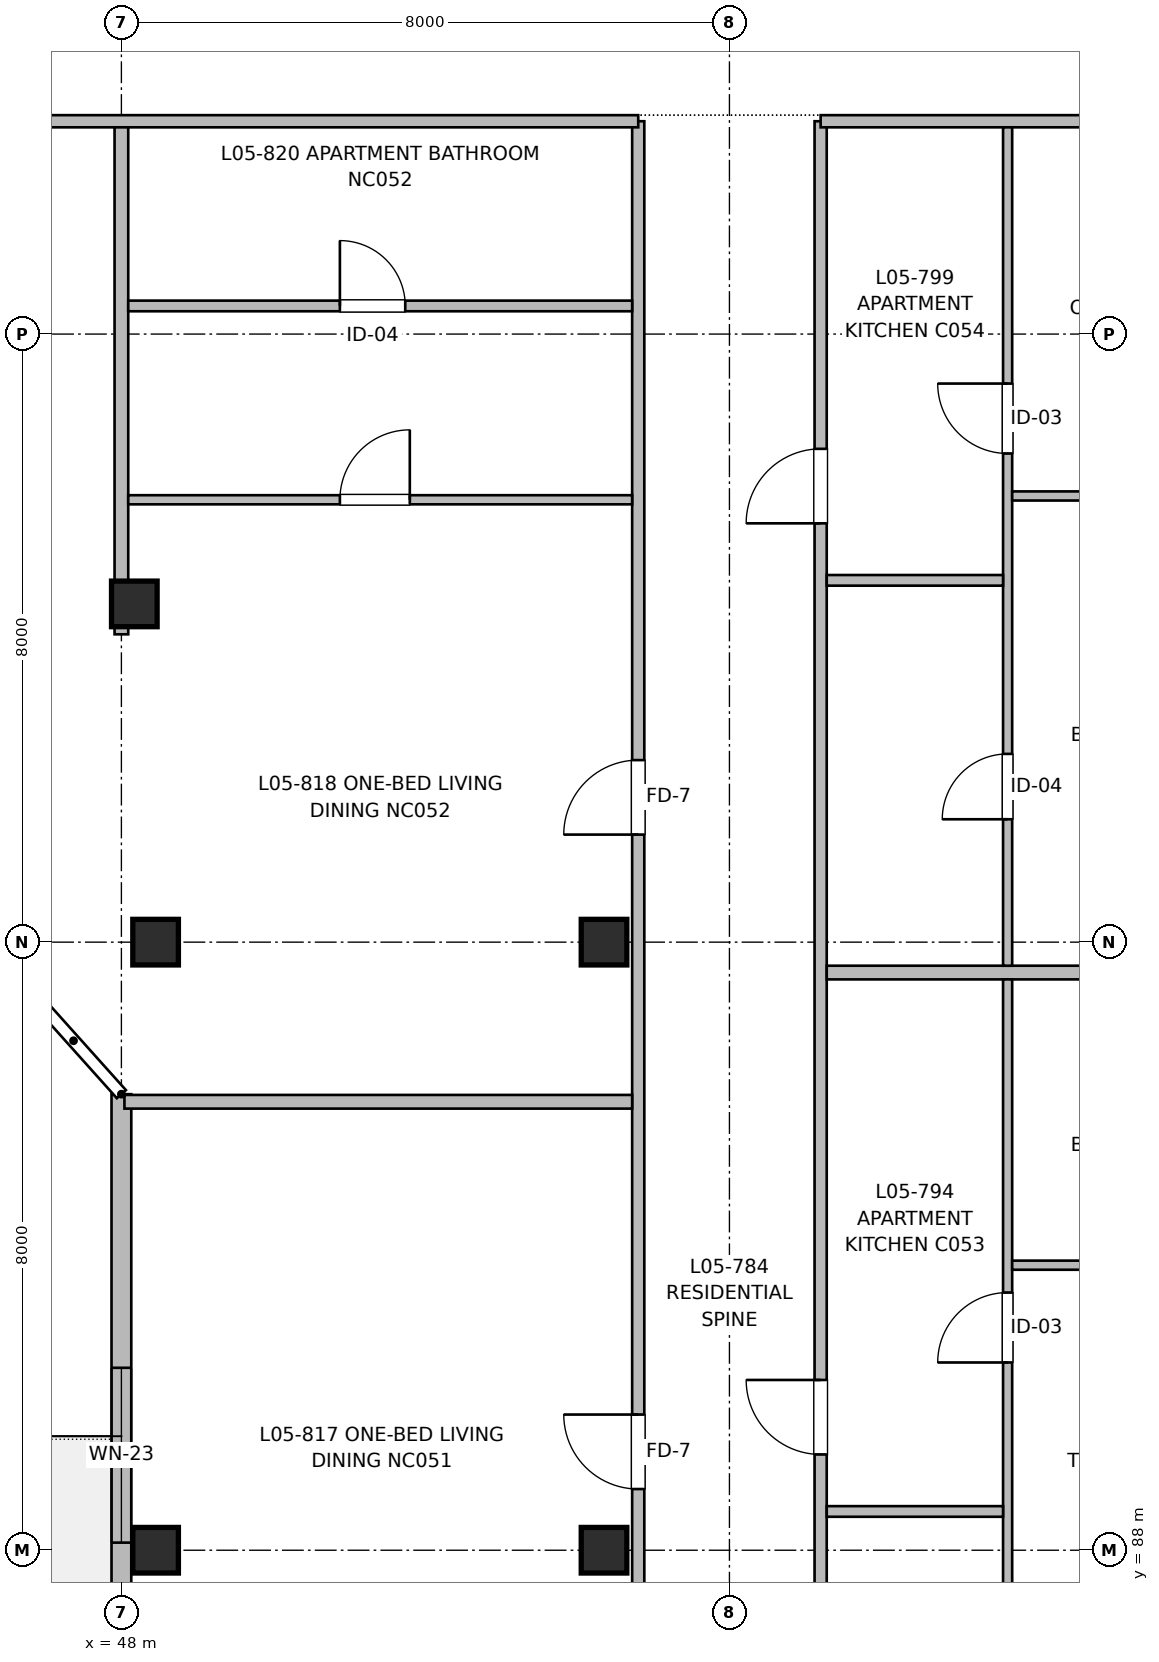
"""IFC4 building model, lengths in metres.
Left out: names, types, materials, properties, quantities, classifications, styles, units other than length and angle.
Written with IfcOpenShell. Run it as: python <this file> out.ifc"""

import sys

from ifc_helpers import new_model, si_unit, direction, frame, frame_2d, origin, origin_2d, place, context, subcontext, project, spatial, rectangle, extrude, element, fill, save


model = new_model("IFC4")
c1 = context("Model", 3, precision=1e-05, world=origin(), true_north=direction((0.0, 1.0)))
c2 = subcontext(c1, "Body", "Model", "MODEL_VIEW")
j1 = project(units=[si_unit("LENGTHUNIT", "METRE"), si_unit("PLANEANGLEUNIT", "RADIAN")], contexts=[c1])
p1 = place(None, origin())
s1 = spatial("IfcSite", under=j1, at=p1, CompositionType="ELEMENT")
p2 = place(p1, origin())
s2 = spatial("IfcBuilding", under=s1, at=p2, CompositionType="ELEMENT")
p3 = place(p2, frame((0.0, 0.0, 16.96)))
s3 = spatial("IfcBuildingStorey", under=s2, at=p3, CompositionType="ELEMENT", Elevation=16.96)
for number, where, z_axis, x_axis in (
    (1, (48.17, 100.45, 0.0), (0.0, 0.0, 1.0), (1.0, 0.0, 0.0)),
    (2, (48.45, 88.0, 0.0), (0.0, 0.0, 1.0), (1.0, 0.0, 0.0)),
    (3, (48.45, 96.0, 0.0), (0.0, 0.0, 1.0), (1.0, 0.0, 0.0)),
    (4, (54.35, 88.0, 0.0), (0.0, 0.0, 1.0), (1.0, 0.0, 0.0)),
    (5, (54.35, 96.0, 0.0), (0.0, 0.0, 1.0), (1.0, 0.0, 0.0)),
):
    element("IfcColumn", number, at=place(p3, frame(where, z_axis=z_axis, x_axis=x_axis)), inside=s3, PredefinedType="COLUMN", context=c2, shape_type="SweptSolid", body=[
        extrude(rectangle(XDim=0.6, YDim=0.6, at=origin_2d()), origin(), (0.0, 0.0, 1.0), 3.2),
    ])
p4 = place(p3, frame((48.0, 56.0, 0.0), z_axis=(0.0, 0.0, 1.0), x_axis=(0.0, 1.0, 0.0)))
e6 = element("IfcWall", 6, at=p4, inside=s3, PredefinedType="SOLIDWALL", context=c2, shape_type="SweptSolid", body=[
    extrude(rectangle(XDim=38.0, YDim=0.26, at=frame_2d((19.0, 0.0))), origin(), (0.0, 0.0, 1.0), 2.98),
])
p5 = place(p4, frame((4.15, 0.0, 0.0)))
e7 = element("IfcOpeningElement", 7, at=p5, cuts=e6, PredefinedType="OPENING", context=c2, shape_type="SweptSolid", body=[
    extrude(rectangle(XDim=1.2, YDim=2.2, at=frame_2d((0.6, 1.1))), frame((0.0, 0.14, 0.0), z_axis=(0.0, -1.0, 0.0), x_axis=(1.0, 0.0, 0.0)), (0.0, 0.0, 1.0), 0.28),
])
p6 = place(p4, frame((6.05, 0.0, 0.72)))
e8 = element("IfcOpeningElement", 8, at=p6, cuts=e6, PredefinedType="OPENING", context=c2, shape_type="SweptSolid", body=[
    extrude(rectangle(XDim=1.68, YDim=1.5, at=frame_2d((0.84, 0.75))), frame((0.0, 0.14, 0.0), z_axis=(0.0, -1.0, 0.0), x_axis=(1.0, 0.0, 0.0)), (0.0, 0.0, 1.0), 0.28),
])
p7 = place(p4, frame((12.9, 0.0, 0.47)))
e9 = element("IfcOpeningElement", 9, at=p7, cuts=e6, PredefinedType="OPENING", context=c2, shape_type="SweptSolid", body=[
    extrude(rectangle(XDim=2.7, YDim=1.75, at=frame_2d((1.35, 0.875))), frame((0.0, 0.14, 0.0), z_axis=(0.0, -1.0, 0.0), x_axis=(1.0, 0.0, 0.0)), (0.0, 0.0, 1.0), 0.28),
])
p8 = place(p4, frame((24.2, 0.0, 0.72)))
e10 = element("IfcOpeningElement", 10, at=p8, cuts=e6, PredefinedType="OPENING", context=c2, shape_type="SweptSolid", body=[
    extrude(rectangle(XDim=1.7, YDim=1.5, at=frame_2d((0.85, 0.75))), frame((0.0, 0.14, 0.0), z_axis=(0.0, -1.0, 0.0), x_axis=(1.0, 0.0, 0.0)), (0.0, 0.0, 1.0), 0.28),
])
p9 = place(p4, frame((32.1, 0.0, 0.57)))
e11 = element("IfcOpeningElement", 11, at=p9, cuts=e6, PredefinedType="OPENING", context=c2, shape_type="SweptSolid", body=[
    extrude(rectangle(XDim=2.3, YDim=1.65, at=frame_2d((1.15, 0.825))), frame((0.0, 0.14, 0.0), z_axis=(0.0, -1.0, 0.0), x_axis=(1.0, 0.0, 0.0)), (0.0, 0.0, 1.0), 0.28),
])
p10 = place(p3, frame((54.8, 56.16, 0.0), z_axis=(0.0, 0.0, 1.0), x_axis=(0.0, 1.0, 0.0)))
e12 = element("IfcWall", 12, at=p10, inside=s3, PredefinedType="PARTITIONING", context=c2, shape_type="SweptSolid", body=[
    extrude(rectangle(XDim=50.64, YDim=0.16, at=frame_2d((25.32, 0.0))), origin(), (0.0, 0.0, 1.0), 2.935),
])
p11 = place(p10, frame((12.84, 0.0, 0.0)))
e13 = element("IfcOpeningElement", 13, at=p11, cuts=e12, PredefinedType="OPENING", context=c2, shape_type="SweptSolid", body=[
    extrude(rectangle(XDim=1.1, YDim=2.15, at=frame_2d((0.55, 1.075))), frame((0.0, 0.09, 0.0), z_axis=(0.0, -1.0, 0.0), x_axis=(1.0, 0.0, 0.0)), (0.0, 0.0, 1.0), 0.18),
])
p12 = place(p10, frame((19.24, 0.0, 0.0)))
e14 = element("IfcOpeningElement", 14, at=p12, cuts=e12, PredefinedType="OPENING", context=c2, shape_type="SweptSolid", body=[
    extrude(rectangle(XDim=1.6, YDim=2.15, at=frame_2d((0.8, 1.075))), frame((0.0, 0.09, 0.0), z_axis=(0.0, -1.0, 0.0), x_axis=(1.0, 0.0, 0.0)), (0.0, 0.0, 1.0), 0.18),
])
p13 = place(p10, frame((1.8, 0.0, 0.0)))
e15 = element("IfcOpeningElement", 15, at=p13, cuts=e12, PredefinedType="OPENING", context=c2, shape_type="SweptSolid", body=[
    extrude(rectangle(XDim=0.96, YDim=2.15, at=frame_2d((0.48, 1.075))), frame((0.0, 0.09, 0.0), z_axis=(0.0, -1.0, 0.0), x_axis=(1.0, 0.0, 0.0)), (0.0, 0.0, 1.0), 0.18),
])
p14 = place(p10, frame((32.645, 0.0, 0.0)))
e16 = element("IfcOpeningElement", 16, at=p14, cuts=e12, PredefinedType="OPENING", context=c2, shape_type="SweptSolid", body=[
    extrude(rectangle(XDim=0.98, YDim=2.15, at=frame_2d((0.49, 1.075))), frame((0.0, 0.09, 0.0), z_axis=(0.0, -1.0, 0.0), x_axis=(1.0, 0.0, 0.0)), (0.0, 0.0, 1.0), 0.18),
])
p15 = place(p10, frame((41.255, 0.0, 0.0)))
e17 = element("IfcOpeningElement", 17, at=p15, cuts=e12, PredefinedType="OPENING", context=c2, shape_type="SweptSolid", body=[
    extrude(rectangle(XDim=0.98, YDim=2.15, at=frame_2d((0.49, 1.075))), frame((0.0, 0.09, 0.0), z_axis=(0.0, -1.0, 0.0), x_axis=(1.0, 0.0, 0.0)), (0.0, 0.0, 1.0), 0.18),
])
p16 = place(p3, frame((57.2, 56.16, 0.0), z_axis=(0.0, 0.0, 1.0), x_axis=(0.0, 1.0, 0.0)))
e18 = element("IfcWall", 18, at=p16, inside=s3, PredefinedType="PARTITIONING", context=c2, shape_type="SweptSolid", body=[
    extrude(rectangle(XDim=50.64, YDim=0.16, at=frame_2d((25.32, 0.0))), origin(), (0.0, 0.0, 1.0), 2.935),
])
p17 = place(p16, frame((5.27, 0.0, 0.0)))
e19 = element("IfcOpeningElement", 19, at=p17, cuts=e18, PredefinedType="OPENING", context=c2, shape_type="SweptSolid", body=[
    extrude(rectangle(XDim=1.5, YDim=2.2, at=frame_2d((0.75, 1.1))), frame((0.0, 0.09, 0.0), z_axis=(0.0, -1.0, 0.0), x_axis=(1.0, 0.0, 0.0)), (0.0, 0.0, 1.0), 0.18),
])
p18 = place(p16, frame((19.4, 0.0, 0.0)))
e20 = element("IfcOpeningElement", 20, at=p18, cuts=e18, PredefinedType="OPENING", context=c2, shape_type="SweptSolid", body=[
    extrude(rectangle(XDim=1.02, YDim=2.15, at=frame_2d((0.51, 1.075))), frame((0.0, 0.09, 0.0), z_axis=(0.0, -1.0, 0.0), x_axis=(1.0, 0.0, 0.0)), (0.0, 0.0, 1.0), 0.18),
])
p19 = place(p16, frame((33.1, 0.0, 0.0)))
e21 = element("IfcOpeningElement", 21, at=p19, cuts=e18, PredefinedType="OPENING", context=c2, shape_type="SweptSolid", body=[
    extrude(rectangle(XDim=0.98, YDim=2.15, at=frame_2d((0.49, 1.075))), frame((0.0, 0.09, 0.0), z_axis=(0.0, -1.0, 0.0), x_axis=(1.0, 0.0, 0.0)), (0.0, 0.0, 1.0), 0.18),
])
p20 = place(p16, frame((45.35, 0.0, 0.0)))
e22 = element("IfcOpeningElement", 22, at=p20, cuts=e18, PredefinedType="OPENING", context=c2, shape_type="SweptSolid", body=[
    extrude(rectangle(XDim=0.98, YDim=2.15, at=frame_2d((0.49, 1.075))), frame((0.0, 0.09, 0.0), z_axis=(0.0, -1.0, 0.0), x_axis=(1.0, 0.0, 0.0)), (0.0, 0.0, 1.0), 0.18),
])
p21 = place(p3, frame((39.66, 106.8, 0.0), z_axis=(0.0, 0.0, 1.0), x_axis=(1.0, 0.0, 0.0)))
e23 = element("IfcWall", 23, at=p21, inside=s3, PredefinedType="PARTITIONING", context=c2, shape_type="SweptSolid", body=[
    extrude(rectangle(XDim=15.14, YDim=0.16, at=frame_2d((7.57, 0.0))), origin(), (0.0, 0.0, 1.0), 2.935),
])
p22 = place(p3, frame((57.2, 106.8, 0.0), z_axis=(0.0, 0.0, 1.0), x_axis=(1.0, 0.0, 0.0)))
e24 = element("IfcWall", 24, at=p22, inside=s3, PredefinedType="PARTITIONING", context=c2, shape_type="SweptSolid", body=[
    extrude(rectangle(XDim=24.14, YDim=0.16, at=frame_2d((12.07, 0.0))), origin(), (0.0, 0.0, 1.0), 2.935),
])
p23 = place(p22, frame((19.575, 0.0, 0.0)))
e25 = element("IfcOpeningElement", 25, at=p23, cuts=e24, PredefinedType="OPENING", context=c2, shape_type="SweptSolid", body=[
    extrude(rectangle(XDim=1.05, YDim=2.15, at=frame_2d((0.525, 1.075))), frame((0.0, 0.09, 0.0), z_axis=(0.0, -1.0, 0.0), x_axis=(1.0, 0.0, 0.0)), (0.0, 0.0, 1.0), 0.18),
])
p24 = place(p22, frame((8.995, 0.0, 0.0)))
e26 = element("IfcOpeningElement", 26, at=p24, cuts=e24, PredefinedType="OPENING", context=c2, shape_type="SweptSolid", body=[
    extrude(rectangle(XDim=0.98, YDim=2.15, at=frame_2d((0.49, 1.075))), frame((0.0, 0.09, 0.0), z_axis=(0.0, -1.0, 0.0), x_axis=(1.0, 0.0, 0.0)), (0.0, 0.0, 1.0), 0.18),
])
p25 = place(p3, frame((48.0, 100.05, 0.0), z_axis=(0.0, 0.0, 1.0), x_axis=(0.0, 1.0, 0.0)))
e27 = element("IfcWall", 27, at=p25, inside=s3, PredefinedType="PARTITIONING", context=c2, shape_type="SweptSolid", body=[
    extrude(rectangle(XDim=6.67, YDim=0.18, at=frame_2d((3.335, 0.0))), origin(), (0.0, 0.0, 1.0), 2.68),
])
p26 = place(p3, frame((57.28, 95.6, 0.0), z_axis=(0.0, 0.0, 1.0), x_axis=(1.0, 0.0, 0.0)))
e28 = element("IfcWall", 28, at=p26, inside=s3, PredefinedType="PARTITIONING", context=c2, shape_type="SweptSolid", body=[
    extrude(rectangle(XDim=13.387, YDim=0.18, at=frame_2d((6.694, 0.0))), origin(), (0.0, 0.0, 1.0), 2.935),
])
p27 = place(p3, frame((59.66, 82.54, 0.0), z_axis=(0.0, 0.0, 1.0), x_axis=(0.0, 1.0, 0.0)))
e29 = element("IfcWall", 29, at=p27, inside=s3, PredefinedType="PARTITIONING", context=c2, shape_type="SweptSolid", body=[
    extrude(rectangle(XDim=12.97, YDim=0.12, at=frame_2d((6.485, 0.0))), origin(), (0.0, 0.0, 1.0), 2.935),
])
p28 = place(p27, frame((2.269, 0.0, 0.0)))
e30 = element("IfcOpeningElement", 30, at=p28, cuts=e29, PredefinedType="OPENING", context=c2, shape_type="SweptSolid", body=[
    extrude(rectangle(XDim=0.86, YDim=2.1, at=frame_2d((0.43, 1.05))), frame((0.0, 0.07, 0.0), z_axis=(0.0, -1.0, 0.0), x_axis=(1.0, 0.0, 0.0)), (0.0, 0.0, 1.0), 0.14),
])
p29 = place(p27, frame((7.93, 0.0, 0.0)))
e31 = element("IfcOpeningElement", 31, at=p29, cuts=e29, PredefinedType="OPENING", context=c2, shape_type="SweptSolid", body=[
    extrude(rectangle(XDim=0.92, YDim=2.1, at=frame_2d((0.46, 1.05))), frame((0.0, 0.07, 0.0), z_axis=(0.0, -1.0, 0.0), x_axis=(1.0, 0.0, 0.0)), (0.0, 0.0, 1.0), 0.14),
])
p30 = place(p3, frame((57.28, 88.51, 0.0), z_axis=(0.0, 0.0, 1.0), x_axis=(1.0, 0.0, 0.0)))
e32 = element("IfcWall", 32, at=p30, inside=s3, PredefinedType="PARTITIONING", context=c2, shape_type="SweptSolid", body=[
    extrude(rectangle(XDim=2.32, YDim=0.14, at=frame_2d((1.16, 0.0))), origin(), (0.0, 0.0, 1.0), 2.935),
])
p31 = place(p3, frame((59.72, 91.75, 0.0), z_axis=(0.0, 0.0, 1.0), x_axis=(1.0, 0.0, 0.0)))
e33 = element("IfcWall", 33, at=p31, inside=s3, PredefinedType="PARTITIONING", context=c2, shape_type="SweptSolid", body=[
    extrude(rectangle(XDim=7.237, YDim=0.12, at=frame_2d((3.619, 0.0))), origin(), (0.0, 0.0, 1.0), 2.935),
])
p32 = place(p31, frame((1.635, 0.0, 0.0)))
e34 = element("IfcOpeningElement", 34, at=p32, cuts=e33, PredefinedType="OPENING", context=c2, shape_type="SweptSolid", body=[
    extrude(rectangle(XDim=0.88, YDim=2.1, at=frame_2d((0.44, 1.05))), frame((0.0, 0.07, 0.0), z_axis=(0.0, -1.0, 0.0), x_axis=(1.0, 0.0, 0.0)), (0.0, 0.0, 1.0), 0.14),
])
p33 = place(p3, frame((59.66, 95.69, 0.0), z_axis=(0.0, 0.0, 1.0), x_axis=(0.0, 1.0, 0.0)))
e35 = element("IfcWall", 35, at=p33, inside=s3, PredefinedType="PARTITIONING", context=c2, shape_type="SweptSolid", body=[
    extrude(rectangle(XDim=11.03, YDim=0.12, at=frame_2d((5.515, 0.0))), origin(), (0.0, 0.0, 1.0), 2.935),
])
p34 = place(p33, frame((1.927, 0.0, 0.0)))
e36 = element("IfcOpeningElement", 36, at=p34, cuts=e35, PredefinedType="OPENING", context=c2, shape_type="SweptSolid", body=[
    extrude(rectangle(XDim=0.86, YDim=2.1, at=frame_2d((0.43, 1.05))), frame((0.0, 0.07, 0.0), z_axis=(0.0, -1.0, 0.0), x_axis=(1.0, 0.0, 0.0)), (0.0, 0.0, 1.0), 0.14),
])
p35 = place(p33, frame((6.739, 0.0, 0.0)))
e37 = element("IfcOpeningElement", 37, at=p35, cuts=e35, PredefinedType="OPENING", context=c2, shape_type="SweptSolid", body=[
    extrude(rectangle(XDim=0.92, YDim=2.1, at=frame_2d((0.46, 1.05))), frame((0.0, 0.07, 0.0), z_axis=(0.0, -1.0, 0.0), x_axis=(1.0, 0.0, 0.0)), (0.0, 0.0, 1.0), 0.14),
])
p36 = place(p3, frame((57.28, 100.76, 0.0), z_axis=(0.0, 0.0, 1.0), x_axis=(1.0, 0.0, 0.0)))
e38 = element("IfcWall", 38, at=p36, inside=s3, PredefinedType="PARTITIONING", context=c2, shape_type="SweptSolid", body=[
    extrude(rectangle(XDim=2.32, YDim=0.14, at=frame_2d((1.16, 0.0))), origin(), (0.0, 0.0, 1.0), 2.935),
])
p37 = place(p3, frame((59.72, 101.87, 0.0), z_axis=(0.0, 0.0, 1.0), x_axis=(1.0, 0.0, 0.0)))
e39 = element("IfcWall", 39, at=p37, inside=s3, PredefinedType="PARTITIONING", context=c2, shape_type="SweptSolid", body=[
    extrude(rectangle(XDim=4.19, YDim=0.12, at=frame_2d((2.095, 0.0))), origin(), (0.0, 0.0, 1.0), 2.935),
])
p38 = place(p37, frame((1.645, 0.0, 0.0)))
e40 = element("IfcOpeningElement", 40, at=p38, cuts=e39, PredefinedType="OPENING", context=c2, shape_type="SweptSolid", body=[
    extrude(rectangle(XDim=0.9, YDim=2.1, at=frame_2d((0.45, 1.05))), frame((0.0, 0.07, 0.0), z_axis=(0.0, -1.0, 0.0), x_axis=(1.0, 0.0, 0.0)), (0.0, 0.0, 1.0), 0.14),
])
p39 = place(p3, frame((48.04, 93.9, 0.0), z_axis=(0.0, 0.0, 1.0), x_axis=(1.0, 0.0, 0.0)))
e41 = element("IfcWall", 41, at=p39, inside=s3, PredefinedType="PARTITIONING", context=c2, shape_type="SweptSolid", body=[
    extrude(rectangle(XDim=6.68, YDim=0.18, at=frame_2d((3.34, 0.0))), origin(), (0.0, 0.0, 1.0), 2.935),
])
p40 = place(p3, frame((48.09, 101.82, 0.0), z_axis=(0.0, 0.0, 1.0), x_axis=(1.0, 0.0, 0.0)))
e42 = element("IfcWall", 42, at=p40, inside=s3, PredefinedType="PARTITIONING", context=c2, shape_type="SweptSolid", body=[
    extrude(rectangle(XDim=6.63, YDim=0.12, at=frame_2d((3.315, 0.0))), origin(), (0.0, 0.0, 1.0), 2.935),
])
p41 = place(p40, frame((2.785, 0.0, 0.0)))
e43 = element("IfcOpeningElement", 43, at=p41, cuts=e42, PredefinedType="OPENING", context=c2, shape_type="SweptSolid", body=[
    extrude(rectangle(XDim=0.92, YDim=2.1, at=frame_2d((0.46, 1.05))), frame((0.0, 0.07, 0.0), z_axis=(0.0, -1.0, 0.0), x_axis=(1.0, 0.0, 0.0)), (0.0, 0.0, 1.0), 0.14),
])
p42 = place(p3, frame((48.09, 104.37, 0.0), z_axis=(0.0, 0.0, 1.0), x_axis=(1.0, 0.0, 0.0)))
e44 = element("IfcWall", 44, at=p42, inside=s3, PredefinedType="PARTITIONING", context=c2, shape_type="SweptSolid", body=[
    extrude(rectangle(XDim=6.63, YDim=0.14, at=frame_2d((3.315, 0.0))), origin(), (0.0, 0.0, 1.0), 2.935),
])
p43 = place(p42, frame((2.785, 0.0, 0.0)))
e45 = element("IfcOpeningElement", 45, at=p43, cuts=e44, PredefinedType="OPENING", context=c2, shape_type="SweptSolid", body=[
    extrude(rectangle(XDim=0.86, YDim=2.1, at=frame_2d((0.43, 1.05))), frame((0.0, 0.08, 0.0), z_axis=(0.0, -1.0, 0.0), x_axis=(1.0, 0.0, 0.0)), (0.0, 0.0, 1.0), 0.16),
])
p44 = place(p9, origin())
e46 = element("IfcWindow", 46, at=p44, inside=s3, PartitioningType="SINGLE_PANEL", PredefinedType="WINDOW", context=c2, shape_type="SweptSolid", body=[
    extrude(rectangle(XDim=2.3, YDim=1.65, at=frame_2d((1.15, 0.825))), frame((0.0, 0.03, 0.0), z_axis=(0.0, -1.0, 0.0), x_axis=(1.0, 0.0, 0.0)), (0.0, 0.0, 1.0), 0.06),
])
fill(e11, e46)
p45 = place(p29, origin())
e47 = element("IfcDoor", 47, at=p45, inside=s3, OperationType="SINGLE_SWING_LEFT", PredefinedType="DOOR", context=c2, shape_type="SweptSolid", body=[
    extrude(rectangle(XDim=0.92, YDim=2.1, at=frame_2d((0.46, 1.05))), frame((0.0, 0.025, 0.0), z_axis=(0.0, -1.0, 0.0), x_axis=(1.0, 0.0, 0.0)), (0.0, 0.0, 1.0), 0.05),
])
fill(e31, e47)
p46 = place(p19, origin())
e48 = element("IfcDoor", 48, at=p46, inside=s3, OperationType="SINGLE_SWING_RIGHT", PredefinedType="DOOR", context=c2, shape_type="SweptSolid", body=[
    extrude(rectangle(XDim=0.98, YDim=2.15, at=frame_2d((0.49, 1.075))), frame((0.0, 0.025, 0.0), z_axis=(0.0, -1.0, 0.0), x_axis=(1.0, 0.0, 0.0)), (0.0, 0.0, 1.0), 0.05),
])
fill(e21, e48)
p47 = place(p34, origin())
e49 = element("IfcDoor", 49, at=p47, inside=s3, OperationType="SINGLE_SWING_LEFT", PredefinedType="DOOR", context=c2, shape_type="SweptSolid", body=[
    extrude(rectangle(XDim=0.86, YDim=2.1, at=frame_2d((0.43, 1.05))), frame((0.0, 0.025, 0.0), z_axis=(0.0, -1.0, 0.0), x_axis=(1.0, 0.0, 0.0)), (0.0, 0.0, 1.0), 0.05),
])
fill(e36, e49)
p48 = place(p35, origin())
e50 = element("IfcDoor", 50, at=p48, inside=s3, OperationType="SINGLE_SWING_RIGHT", PredefinedType="DOOR", context=c2, shape_type="SweptSolid", body=[
    extrude(rectangle(XDim=0.92, YDim=2.1, at=frame_2d((0.46, 1.05))), frame((0.0, 0.025, 0.0), z_axis=(0.0, -1.0, 0.0), x_axis=(1.0, 0.0, 0.0)), (0.0, 0.0, 1.0), 0.05),
])
fill(e37, e50)
p49 = place(p20, origin())
e51 = element("IfcDoor", 51, at=p49, inside=s3, OperationType="SINGLE_SWING_LEFT", PredefinedType="DOOR", context=c2, shape_type="SweptSolid", body=[
    extrude(rectangle(XDim=0.98, YDim=2.15, at=frame_2d((0.49, 1.075))), frame((0.0, 0.025, 0.0), z_axis=(0.0, -1.0, 0.0), x_axis=(1.0, 0.0, 0.0)), (0.0, 0.0, 1.0), 0.05),
])
fill(e22, e51)
p50 = place(p14, origin())
e52 = element("IfcDoor", 52, at=p50, inside=s3, OperationType="SINGLE_SWING_RIGHT", PredefinedType="DOOR", context=c2, shape_type="SweptSolid", body=[
    extrude(rectangle(XDim=0.98, YDim=2.15, at=frame_2d((0.49, 1.075))), frame((0.0, 0.025, 0.0), z_axis=(0.0, -1.0, 0.0), x_axis=(1.0, 0.0, 0.0)), (0.0, 0.0, 1.0), 0.05),
])
fill(e16, e52)
p51 = place(p43, origin())
e53 = element("IfcDoor", 53, at=p51, inside=s3, OperationType="SINGLE_SWING_LEFT", PredefinedType="DOOR", context=c2, shape_type="SweptSolid", body=[
    extrude(rectangle(XDim=0.86, YDim=2.1, at=frame_2d((0.43, 1.05))), frame((0.0, 0.025, 0.0), z_axis=(0.0, -1.0, 0.0), x_axis=(1.0, 0.0, 0.0)), (0.0, 0.0, 1.0), 0.05),
])
fill(e45, e53)
p52 = place(p41, origin())
e54 = element("IfcDoor", 54, at=p52, inside=s3, OperationType="SINGLE_SWING_RIGHT", PredefinedType="DOOR", context=c2, shape_type="SweptSolid", body=[
    extrude(rectangle(XDim=0.92, YDim=2.1, at=frame_2d((0.46, 1.05))), frame((0.0, 0.025, 0.0), z_axis=(0.0, -1.0, 0.0), x_axis=(1.0, 0.0, 0.0)), (0.0, 0.0, 1.0), 0.05),
])
fill(e43, e54)
p53 = place(p15, origin())
e55 = element("IfcDoor", 55, at=p53, inside=s3, OperationType="SINGLE_SWING_LEFT", PredefinedType="DOOR", context=c2, shape_type="SweptSolid", body=[
    extrude(rectangle(XDim=0.98, YDim=2.15, at=frame_2d((0.49, 1.075))), frame((0.0, 0.025, 0.0), z_axis=(0.0, -1.0, 0.0), x_axis=(1.0, 0.0, 0.0)), (0.0, 0.0, 1.0), 0.05),
])
fill(e17, e55)
save(model, sys.argv[1])
